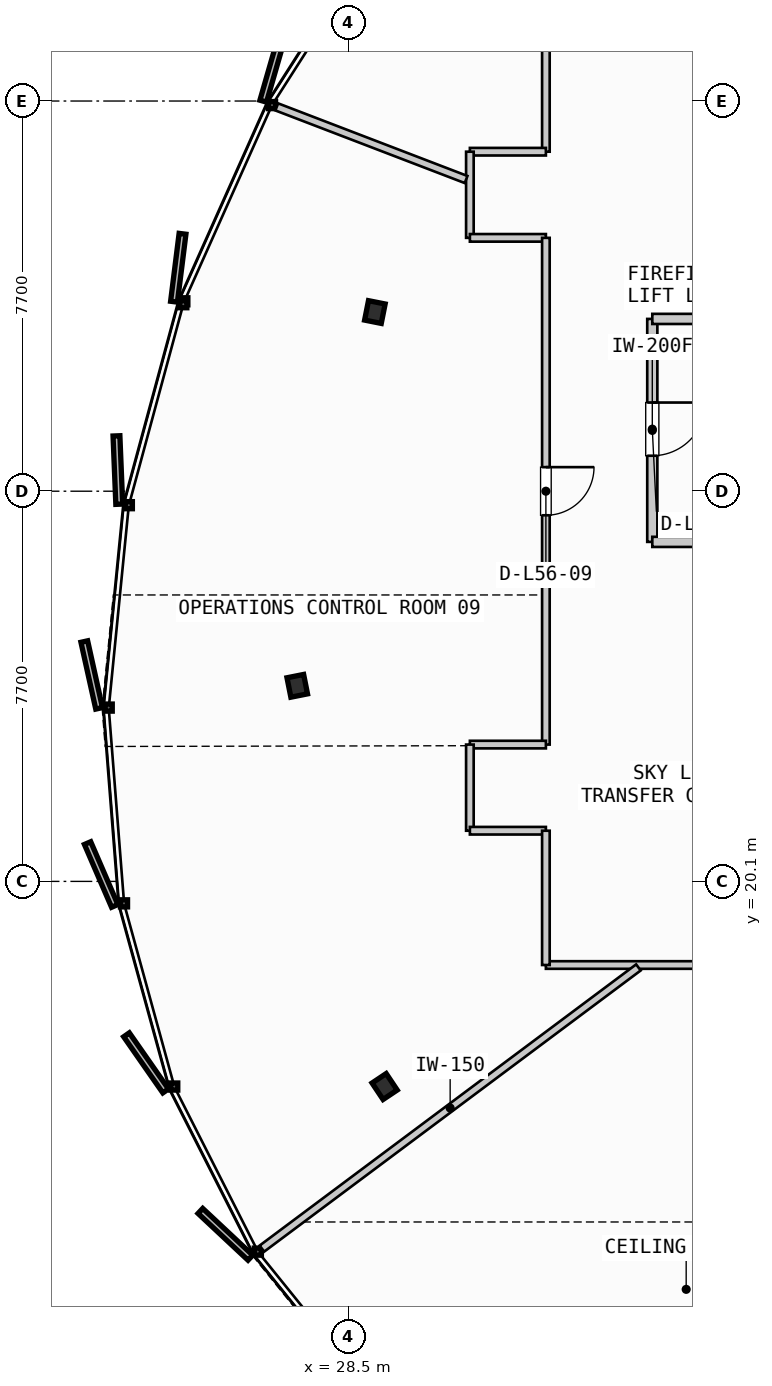
"""IFC4 building model, lengths in metres.
Left out: names, types, materials, properties, quantities, classifications, styles, units other than length and angle.
Written with IfcOpenShell. Run it as: python <this file> out.ifc"""

import sys

from ifc_helpers import new_model, si_unit, direction, frame, frame_2d, origin, origin_2d, place, context, subcontext, project, spatial, rectangle, i_section, extrude, source, transform, mapped, element, fill, save


model = new_model("IFC4")
c1 = context("Model", 3, precision=1e-05, world=origin(), true_north=direction((0.0, 1.0)))
c2 = subcontext(c1, "Body", "Model", "MODEL_VIEW")
j1 = project(units=[si_unit("LENGTHUNIT", "METRE"), si_unit("PLANEANGLEUNIT", "RADIAN")], contexts=[c1])
p1 = place(None, origin())
s1 = spatial("IfcSite", under=j1, at=p1, CompositionType="ELEMENT")
p2 = place(p1, origin())
s2 = spatial("IfcBuilding", under=s1, at=p2, CompositionType="ELEMENT")
p3 = place(p2, frame((0.0, 0.0, 214.9)))
s3 = spatial("IfcBuildingStorey", under=s2, at=p3, CompositionType="ELEMENT", Elevation=214.9)
m1 = source(origin(), c2, "Body", "SweptSolid", [
    extrude(i_section(OverallWidth=0.391, OverallDepth=0.335, WebThickness=0.023, FlangeThickness=0.034, FilletRadius=0.015, at=origin_2d()), origin(), (0.0, 0.0, 1.0), 3.24),
])
for number, where, z_axis, x_axis in (
    (1, (29.025, 31.336, 0.0), (0.0, 0.0, 1.0), (-0.981, 0.195, 0.0)),
    (2, (27.493, 23.96, 0.0), (0.0, 0.0, 1.0), (-0.981, -0.195, 0.0)),
    (3, (29.218, 16.052, 0.0), (0.0, 0.0, 1.0), (-0.831, -0.556, 0.0)),
):
    element("IfcColumn", number, at=place(p3, frame(where, z_axis=z_axis, x_axis=x_axis)), inside=s3, PredefinedType="COLUMN", context=c2, shape_type="MappedRepresentation", body=[
        mapped(m1, transform((0.0, 0.0, 0.0), scale=1.0)),
    ])
p4 = place(p3, frame((34.5, 31.2, 0.0), z_axis=(0.0, 0.0, 1.0), x_axis=(0.0, -1.0, 0.0)))
e4 = element("IfcWall", 4, at=p4, inside=s3, PredefinedType="PARTITIONING", context=c2, shape_type="SweptSolid", body=[
    extrude(rectangle(XDim=4.4, YDim=0.2, at=frame_2d((2.2, 0.0))), origin(), (0.0, 0.0, 1.0), 2.295),
])
p5 = place(p4, frame((1.65, 0.0, 0.0)))
e5 = element("IfcOpeningElement", 5, at=p5, cuts=e4, PredefinedType="OPENING", context=c2, shape_type="SweptSolid", body=[
    extrude(rectangle(XDim=1.05, YDim=2.15, at=frame_2d((0.525, 1.075))), frame((0.0, 0.11, 0.0), z_axis=(0.0, -1.0, 0.0), x_axis=(1.0, 0.0, 0.0)), (0.0, 0.0, 1.0), 0.22),
])
for number, where, z_axis, x_axis in (
    (6, (34.5, 26.8, 0.0), (0.0, 0.0, 1.0), (1.0, 0.0, 0.0)),
    (7, (34.5, 31.2, 0.0), (0.0, 0.0, 1.0), (1.0, 0.0, 0.0)),
):
    element("IfcWall", number, at=place(p3, frame(where, z_axis=z_axis, x_axis=x_axis)), inside=s3, PredefinedType="PARTITIONING", context=c2, shape_type="SweptSolid", body=[
        extrude(rectangle(XDim=3.215, YDim=0.2, at=frame_2d((1.607, 0.0))), origin(), (0.0, 0.0, 1.0), 2.295),
    ])
p6 = place(p3, frame((32.4, 18.45, 0.0), z_axis=(0.0, 0.0, 1.0), x_axis=(1.0, 0.0, 0.0)))
e8 = element("IfcWall", 8, at=p6, inside=s3, PredefinedType="PARTITIONING", context=c2, shape_type="SweptSolid", body=[
    extrude(rectangle(XDim=28.35, YDim=0.15, at=frame_2d((14.175, 0.0))), origin(), (0.0, 0.0, 1.0), 2.295),
])
p7 = place(p6, frame((7.522, 0.0, 0.0)))
e9 = element("IfcOpeningElement", 9, at=p7, cuts=e8, PredefinedType="OPENING", context=c2, shape_type="SweptSolid", body=[
    extrude(rectangle(XDim=0.95, YDim=2.15, at=frame_2d((0.475, 1.075))), frame((0.0, 0.085, 0.0), z_axis=(0.0, -1.0, 0.0), x_axis=(1.0, 0.0, 0.0)), (0.0, 0.0, 1.0), 0.17),
])
p8 = place(p6, frame((18.604, 0.0, 0.0)))
e10 = element("IfcOpeningElement", 10, at=p8, cuts=e8, PredefinedType="OPENING", context=c2, shape_type="SweptSolid", body=[
    extrude(rectangle(XDim=0.95, YDim=2.15, at=frame_2d((0.475, 1.075))), frame((0.0, 0.085, 0.0), z_axis=(0.0, -1.0, 0.0), x_axis=(1.0, 0.0, 0.0)), (0.0, 0.0, 1.0), 0.17),
])
p9 = place(p6, frame((25.285, 0.0, 0.0)))
e11 = element("IfcOpeningElement", 11, at=p9, cuts=e8, PredefinedType="OPENING", context=c2, shape_type="SweptSolid", body=[
    extrude(rectangle(XDim=0.95, YDim=2.15, at=frame_2d((0.475, 1.075))), frame((0.0, 0.085, 0.0), z_axis=(0.0, -1.0, 0.0), x_axis=(1.0, 0.0, 0.0)), (0.0, 0.0, 1.0), 0.17),
])
p10 = place(p3, frame((32.4, 37.15, 0.0), z_axis=(0.0, 0.0, 1.0), x_axis=(0.0, -1.0, 0.0)))
e12 = element("IfcWall", 12, at=p10, inside=s3, PredefinedType="PARTITIONING", context=c2, shape_type="SweptSolid", body=[
    extrude(rectangle(XDim=2.65, YDim=0.15, at=frame_2d((1.325, 0.0))), origin(), (0.0, 0.0, 1.0), 2.295),
])
p11 = place(p3, frame((32.4, 34.5, 0.0), z_axis=(0.0, 0.0, 1.0), x_axis=(-1.0, 0.0, 0.0)))
e13 = element("IfcWall", 13, at=p11, inside=s3, PredefinedType="PARTITIONING", context=c2, shape_type="SweptSolid", body=[
    extrude(rectangle(XDim=1.5, YDim=0.15, at=frame_2d((0.75, 0.0))), origin(), (0.0, 0.0, 1.0), 2.295),
])
p12 = place(p3, frame((30.9, 34.5, 0.0), z_axis=(0.0, 0.0, 1.0), x_axis=(0.0, -1.0, 0.0)))
e14 = element("IfcWall", 14, at=p12, inside=s3, PredefinedType="PARTITIONING", context=c2, shape_type="SweptSolid", body=[
    extrude(rectangle(XDim=1.7, YDim=0.15, at=frame_2d((0.85, 0.0))), origin(), (0.0, 0.0, 1.0), 2.295),
])
p13 = place(p3, frame((30.9, 32.8, 0.0), z_axis=(0.0, 0.0, 1.0), x_axis=(1.0, 0.0, 0.0)))
e15 = element("IfcWall", 15, at=p13, inside=s3, PredefinedType="PARTITIONING", context=c2, shape_type="SweptSolid", body=[
    extrude(rectangle(XDim=1.5, YDim=0.15, at=frame_2d((0.75, 0.0))), origin(), (0.0, 0.0, 1.0), 2.295),
])
p14 = place(p3, frame((32.4, 32.8, 0.0), z_axis=(0.0, 0.0, 1.0), x_axis=(0.0, -1.0, 0.0)))
e16 = element("IfcWall", 16, at=p14, inside=s3, PredefinedType="PARTITIONING", context=c2, shape_type="SweptSolid", body=[
    extrude(rectangle(XDim=10.0, YDim=0.15, at=frame_2d((5.0, 0.0))), origin(), (0.0, 0.0, 1.0), 2.295),
])
p15 = place(p14, frame((4.525, 0.0, 0.0)))
e17 = element("IfcOpeningElement", 17, at=p15, cuts=e16, PredefinedType="OPENING", context=c2, shape_type="SweptSolid", body=[
    extrude(rectangle(XDim=0.95, YDim=2.15, at=frame_2d((0.475, 1.075))), frame((0.0, 0.085, 0.0), z_axis=(0.0, -1.0, 0.0), x_axis=(1.0, 0.0, 0.0)), (0.0, 0.0, 1.0), 0.17),
])
p16 = place(p3, frame((32.4, 22.8, 0.0), z_axis=(0.0, 0.0, 1.0), x_axis=(-1.0, 0.0, 0.0)))
e18 = element("IfcWall", 18, at=p16, inside=s3, PredefinedType="PARTITIONING", context=c2, shape_type="SweptSolid", body=[
    extrude(rectangle(XDim=1.5, YDim=0.15, at=frame_2d((0.75, 0.0))), origin(), (0.0, 0.0, 1.0), 2.295),
])
p17 = place(p3, frame((30.9, 22.8, 0.0), z_axis=(0.0, 0.0, 1.0), x_axis=(0.0, -1.0, 0.0)))
e19 = element("IfcWall", 19, at=p17, inside=s3, PredefinedType="PARTITIONING", context=c2, shape_type="SweptSolid", body=[
    extrude(rectangle(XDim=1.7, YDim=0.15, at=frame_2d((0.85, 0.0))), origin(), (0.0, 0.0, 1.0), 2.295),
])
p18 = place(p3, frame((30.9, 21.1, 0.0), z_axis=(0.0, 0.0, 1.0), x_axis=(1.0, 0.0, 0.0)))
e20 = element("IfcWall", 20, at=p18, inside=s3, PredefinedType="PARTITIONING", context=c2, shape_type="SweptSolid", body=[
    extrude(rectangle(XDim=1.5, YDim=0.15, at=frame_2d((0.75, 0.0))), origin(), (0.0, 0.0, 1.0), 2.295),
])
p19 = place(p3, frame((32.4, 21.1, 0.0), z_axis=(0.0, 0.0, 1.0), x_axis=(0.0, -1.0, 0.0)))
e21 = element("IfcWall", 21, at=p19, inside=s3, PredefinedType="PARTITIONING", context=c2, shape_type="SweptSolid", body=[
    extrude(rectangle(XDim=2.65, YDim=0.15, at=frame_2d((1.325, 0.0))), origin(), (0.0, 0.0, 1.0), 2.295),
])
p20 = place(p3, frame((34.226, 18.402, 0.0), z_axis=(0.0, 0.0, 1.0), x_axis=(-0.801249258775, -0.598330698956, 0.0)))
e22 = element("IfcWall", 22, at=p20, inside=s3, PredefinedType="PARTITIONING", context=c2, shape_type="SweptSolid", body=[
    extrude(rectangle(XDim=9.274, YDim=0.15, at=frame_2d((4.637, 0.0))), origin(), (0.0, 0.0, 1.0), 2.295),
])
p21 = place(p3, frame((30.825, 33.951, 0.0), z_axis=(0.0, 0.0, 1.0), x_axis=(-0.933691058524, 0.358079610188, 0.0)))
e23 = element("IfcWall", 23, at=p21, inside=s3, PredefinedType="PARTITIONING", context=c2, shape_type="SweptSolid", body=[
    extrude(rectangle(XDim=4.002, YDim=0.15, at=frame_2d((2.001, 0.0))), origin(), (0.0, 0.0, 1.0), 2.295),
])
m2 = source(origin(), c2, "Body", "SweptSolid", [
    extrude(rectangle(XDim=1.05, YDim=2.15, at=frame_2d((0.525, 1.075))), frame((0.0, 0.025, 0.0), z_axis=(0.0, -1.0, 0.0), x_axis=(1.0, 0.0, 0.0)), (0.0, 0.0, 1.0), 0.05),
])
p22 = place(p5, origin())
e24 = element("IfcDoor", 24, at=p22, inside=s3, OperationType="SINGLE_SWING_LEFT", PredefinedType="DOOR", context=c2, shape_type="MappedRepresentation", body=[
    mapped(m2, transform((0.0, 0.0, 0.0), scale=1.0)),
])
fill(e5, e24)
m3 = source(origin(), c2, "Body", "SweptSolid", [
    extrude(rectangle(XDim=0.95, YDim=2.15, at=frame_2d((0.475, 1.075))), frame((0.0, 0.025, 0.0), z_axis=(0.0, -1.0, 0.0), x_axis=(1.0, 0.0, 0.0)), (0.0, 0.0, 1.0), 0.05),
])
p23 = place(p15, origin())
e25 = element("IfcDoor", 25, at=p23, inside=s3, OperationType="SINGLE_SWING_LEFT", PredefinedType="DOOR", context=c2, shape_type="MappedRepresentation", body=[
    mapped(m3, transform((0.0, 0.0, 0.0), scale=1.0)),
])
fill(e17, e25)
save(model, sys.argv[1])
